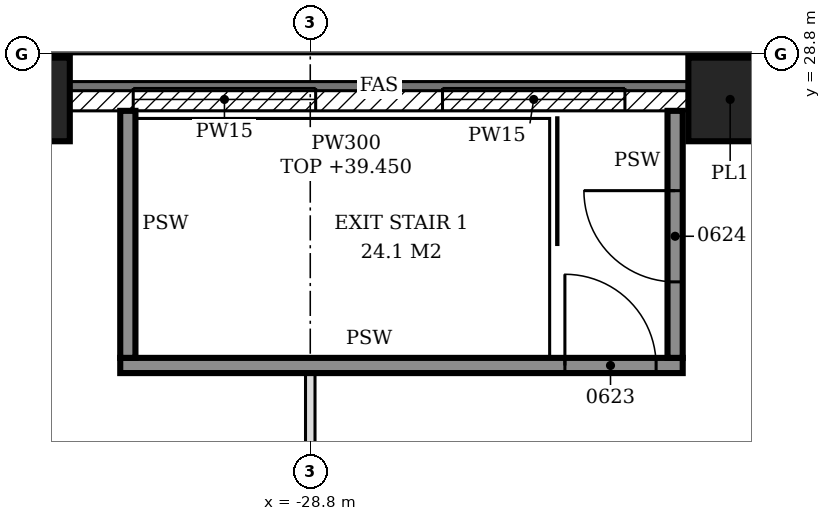
"""IFC4 building model, lengths in metres.
Left out: names, types, materials, properties, quantities, classifications, styles, units other than length and angle.
Written with IfcOpenShell. Run it as: python <this file> out.ifc"""

import sys

from ifc_helpers import new_model, si_unit, direction, frame, frame_2d, origin, origin_2d, place, context, subcontext, project, spatial, polyline, rectangle, hollow_rectangle, outline, extrude, element, fill, save


model = new_model("IFC4")
c1 = context("Model", 3, precision=1e-05, world=origin(), true_north=direction((0.0, 1.0)))
c2 = subcontext(c1, "Body", "Model", "MODEL_VIEW")
j1 = project(units=[si_unit("LENGTHUNIT", "METRE"), si_unit("PLANEANGLEUNIT", "RADIAN")], contexts=[c1])
p1 = place(None, origin())
s1 = spatial("IfcSite", under=j1, at=p1, CompositionType="ELEMENT")
p2 = place(p1, origin())
s2 = spatial("IfcBuilding", under=s1, at=p2, CompositionType="ELEMENT")
p3 = place(p2, frame((0.0, 0.0, 35.4)))
s3 = spatial("IfcBuildingStorey", under=s2, at=p3, CompositionType="ELEMENT", Elevation=35.4)
for number, where, z_axis, x_axis in (
    (1, (-23.276, 28.2, 0.0), (0.0, 0.0, 1.0), (1.0, 0.0, 0.0)),
    (2, (-32.514, 28.2, 0.0), (0.0, 0.0, 1.0), (1.0, 0.0, 0.0)),
):
    element("IfcColumn", number, at=place(p3, frame(where, z_axis=z_axis, x_axis=x_axis)), inside=s3, PredefinedType="COLUMN", context=c2, shape_type="SweptSolid", body=[
        extrude(hollow_rectangle(XDim=1.1, YDim=1.1, WallThickness=0.06, at=origin_2d()), origin(), (0.0, 0.0, 1.0), 4.65),
    ])
p4 = place(p3, frame((-23.826, 28.2, 0.0), z_axis=(0.0, 0.0, 1.0), x_axis=(-1.0, 0.0, 0.0)))
e3 = element("IfcWall", 3, at=p4, inside=s3, PredefinedType="SOLIDWALL", context=c2, shape_type="SweptSolid", body=[
    extrude(rectangle(XDim=8.138, YDim=0.3, at=frame_2d((4.069, 0.0))), origin(), (0.0, 0.0, 1.0), 4.05),
])
p5 = place(p4, frame((0.834, 0.0, 0.9)))
e4 = element("IfcOpeningElement", 4, at=p5, cuts=e3, PredefinedType="OPENING", context=c2, shape_type="SweptSolid", body=[
    extrude(rectangle(XDim=2.4, YDim=1.5, at=frame_2d((1.2, 0.75))), frame((0.0, 0.16, 0.0), z_axis=(0.0, -1.0, 0.0), x_axis=(1.0, 0.0, 0.0)), (0.0, 0.0, 1.0), 0.32),
])
p6 = place(p4, frame((4.903, 0.0, 0.9)))
e5 = element("IfcOpeningElement", 5, at=p6, cuts=e3, PredefinedType="OPENING", context=c2, shape_type="SweptSolid", body=[
    extrude(rectangle(XDim=2.4, YDim=1.5, at=frame_2d((1.2, 0.75))), frame((0.0, 0.16, 0.0), z_axis=(0.0, -1.0, 0.0), x_axis=(1.0, 0.0, 0.0)), (0.0, 0.0, 1.0), 0.32),
])
p7 = place(p3, frame((-28.8, -24.6, 0.0), z_axis=(0.0, 0.0, 1.0), x_axis=(0.0, 1.0, 0.0)))
e6 = element("IfcWall", 6, at=p7, inside=s3, PredefinedType="PARTITIONING", context=c2, shape_type="SweptSolid", body=[
    extrude(outline(polyline([(0.0, 0.0), (49.2, 0.0), (49.2, 4.65), (43.95, 4.65), (43.948, 4.03), (43.65, 4.03), (43.648, 4.65), (39.15, 4.65), (39.148, 4.03), (38.85, 4.03), (38.848, 4.65), (34.35, 4.65), (34.348, 4.03), (34.05, 4.03), (34.048, 4.65), (29.55, 4.65), (29.548, 4.03), (29.25, 4.03), (29.248, 4.65), (24.75, 4.65), (24.748, 4.03), (24.45, 4.03), (24.448, 4.65), (19.95, 4.65), (19.948, 4.03), (19.65, 4.03), (19.648, 4.65), (15.15, 4.65), (15.148, 4.03), (14.85, 4.03), (14.848, 4.65), (10.35, 4.65), (10.348, 4.03), (10.05, 4.03), (10.048, 4.65), (5.55, 4.65), (5.548, 4.03), (5.25, 4.03), (5.248, 4.65), (0.0, 4.65), (0.0, 0.0)])), frame((0.0, 0.062, 0.0), z_axis=(0.0, -1.0, 0.0), x_axis=(1.0, 0.0, 0.0)), (0.0, 0.0, 1.0), 0.125),
])
p8 = place(p7, frame((1.7, 0.0, 0.0)))
e7 = element("IfcOpeningElement", 7, at=p8, cuts=e6, PredefinedType="OPENING", context=c2, shape_type="SweptSolid", body=[
    extrude(rectangle(XDim=1.8, YDim=2.1, at=frame_2d((0.9, 1.05))), frame((0.0, 0.073, 0.0), z_axis=(0.0, -1.0, 0.0), x_axis=(1.0, 0.0, 0.0)), (0.0, 0.0, 1.0), 0.145),
])
p9 = place(p7, frame((8.05, 0.0, 0.0)))
e8 = element("IfcOpeningElement", 8, at=p9, cuts=e6, PredefinedType="OPENING", context=c2, shape_type="SweptSolid", body=[
    extrude(rectangle(XDim=1.8, YDim=2.1, at=frame_2d((0.9, 1.05))), frame((0.0, 0.073, 0.0), z_axis=(0.0, -1.0, 0.0), x_axis=(1.0, 0.0, 0.0)), (0.0, 0.0, 1.0), 0.145),
])
p10 = place(p7, frame((14.7, 0.0, 0.0)))
e9 = element("IfcOpeningElement", 9, at=p10, cuts=e6, PredefinedType="OPENING", context=c2, shape_type="SweptSolid", body=[
    extrude(rectangle(XDim=1.8, YDim=2.1, at=frame_2d((0.9, 1.05))), frame((0.0, 0.073, 0.0), z_axis=(0.0, -1.0, 0.0), x_axis=(1.0, 0.0, 0.0)), (0.0, 0.0, 1.0), 0.145),
])
p11 = place(p7, frame((21.2, 0.0, 0.0)))
e10 = element("IfcOpeningElement", 10, at=p11, cuts=e6, PredefinedType="OPENING", context=c2, shape_type="SweptSolid", body=[
    extrude(rectangle(XDim=1.8, YDim=2.1, at=frame_2d((0.9, 1.05))), frame((0.0, 0.073, 0.0), z_axis=(0.0, -1.0, 0.0), x_axis=(1.0, 0.0, 0.0)), (0.0, 0.0, 1.0), 0.145),
])
p12 = place(p7, frame((26.2, 0.0, 0.0)))
e11 = element("IfcOpeningElement", 11, at=p12, cuts=e6, PredefinedType="OPENING", context=c2, shape_type="SweptSolid", body=[
    extrude(rectangle(XDim=1.8, YDim=2.1, at=frame_2d((0.9, 1.05))), frame((0.0, 0.073, 0.0), z_axis=(0.0, -1.0, 0.0), x_axis=(1.0, 0.0, 0.0)), (0.0, 0.0, 1.0), 0.145),
])
p13 = place(p7, frame((32.7, 0.0, 0.0)))
e12 = element("IfcOpeningElement", 12, at=p13, cuts=e6, PredefinedType="OPENING", context=c2, shape_type="SweptSolid", body=[
    extrude(rectangle(XDim=1.8, YDim=2.1, at=frame_2d((0.9, 1.05))), frame((0.0, 0.073, 0.0), z_axis=(0.0, -1.0, 0.0), x_axis=(1.0, 0.0, 0.0)), (0.0, 0.0, 1.0), 0.145),
])
p14 = place(p7, frame((39.35, 0.0, 0.0)))
e13 = element("IfcOpeningElement", 13, at=p14, cuts=e6, PredefinedType="OPENING", context=c2, shape_type="SweptSolid", body=[
    extrude(rectangle(XDim=1.8, YDim=2.1, at=frame_2d((0.9, 1.05))), frame((0.0, 0.073, 0.0), z_axis=(0.0, -1.0, 0.0), x_axis=(1.0, 0.0, 0.0)), (0.0, 0.0, 1.0), 0.145),
])
p15 = place(p7, frame((45.7, 0.0, 0.0)))
e14 = element("IfcOpeningElement", 14, at=p15, cuts=e6, PredefinedType="OPENING", context=c2, shape_type="SweptSolid", body=[
    extrude(rectangle(XDim=1.8, YDim=2.1, at=frame_2d((0.9, 1.05))), frame((0.0, 0.073, 0.0), z_axis=(0.0, -1.0, 0.0), x_axis=(1.0, 0.0, 0.0)), (0.0, 0.0, 1.0), 0.145),
])
p16 = place(p3, frame((-31.3, 24.7, 0.0), z_axis=(0.0, 0.0, 1.0), x_axis=(1.0, 0.0, 0.0)))
e15 = element("IfcWall", 15, at=p16, inside=s3, PredefinedType="SOLIDWALL", context=c2, shape_type="SweptSolid", body=[
    extrude(rectangle(XDim=7.4, YDim=0.2, at=frame_2d((3.7, 0.0))), origin(), (0.0, 0.0, 1.0), 4.65),
])
p17 = place(p16, frame((5.85, 0.0, 0.0)))
e16 = element("IfcOpeningElement", 16, at=p17, cuts=e15, PredefinedType="OPENING", context=c2, shape_type="SweptSolid", body=[
    extrude(rectangle(XDim=1.2, YDim=2.1, at=frame_2d((0.6, 1.05))), frame((0.0, 0.11, 0.0), z_axis=(0.0, -1.0, 0.0), x_axis=(1.0, 0.0, 0.0)), (0.0, 0.0, 1.0), 0.22),
])
p18 = place(p3, frame((-31.2, 24.8, 0.0), z_axis=(0.0, 0.0, 1.0), x_axis=(0.0, 1.0, 0.0)))
e17 = element("IfcWall", 17, at=p18, inside=s3, PredefinedType="SOLIDWALL", context=c2, shape_type="SweptSolid", body=[
    extrude(rectangle(XDim=3.25, YDim=0.2, at=frame_2d((1.625, 0.0))), origin(), (0.0, 0.0, 1.0), 4.65),
])
p19 = place(p3, frame((-24.0, 24.8, 0.0), z_axis=(0.0, 0.0, 1.0), x_axis=(0.0, 1.0, 0.0)))
e18 = element("IfcWall", 18, at=p19, inside=s3, PredefinedType="SOLIDWALL", context=c2, shape_type="SweptSolid", body=[
    extrude(rectangle(XDim=3.25, YDim=0.2, at=frame_2d((1.625, 0.0))), origin(), (0.0, 0.0, 1.0), 4.65),
])
p20 = place(p19, frame((1.0, 0.0, 0.0)))
e19 = element("IfcOpeningElement", 19, at=p20, cuts=e18, PredefinedType="OPENING", context=c2, shape_type="SweptSolid", body=[
    extrude(rectangle(XDim=1.2, YDim=2.1, at=frame_2d((0.6, 1.05))), frame((0.0, 0.11, 0.0), z_axis=(0.0, -1.0, 0.0), x_axis=(1.0, 0.0, 0.0)), (0.0, 0.0, 1.0), 0.22),
])
p21 = place(p5, origin())
e20 = element("IfcWindow", 20, at=p21, inside=s3, PartitioningType="SINGLE_PANEL", PredefinedType="WINDOW", context=c2, shape_type="SweptSolid", body=[
    extrude(rectangle(XDim=2.4, YDim=1.5, at=frame_2d((1.2, 0.75))), frame((0.0, 0.03, 0.0), z_axis=(0.0, -1.0, 0.0), x_axis=(1.0, 0.0, 0.0)), (0.0, 0.0, 1.0), 0.06),
])
fill(e4, e20)
p22 = place(p6, origin())
e21 = element("IfcWindow", 21, at=p22, inside=s3, PartitioningType="SINGLE_PANEL", PredefinedType="WINDOW", context=c2, shape_type="SweptSolid", body=[
    extrude(rectangle(XDim=2.4, YDim=1.5, at=frame_2d((1.2, 0.75))), frame((0.0, 0.03, 0.0), z_axis=(0.0, -1.0, 0.0), x_axis=(1.0, 0.0, 0.0)), (0.0, 0.0, 1.0), 0.06),
])
fill(e5, e21)
p23 = place(p17, origin())
e22 = element("IfcDoor", 22, at=p23, inside=s3, OperationType="SINGLE_SWING_LEFT", PredefinedType="DOOR", context=c2, shape_type="SweptSolid", body=[
    extrude(rectangle(XDim=1.2, YDim=2.1, at=frame_2d((0.6, 1.05))), frame((0.0, 0.025, 0.0), z_axis=(0.0, -1.0, 0.0), x_axis=(1.0, 0.0, 0.0)), (0.0, 0.0, 1.0), 0.05),
])
fill(e16, e22)
p24 = place(p20, origin())
e23 = element("IfcDoor", 23, at=p24, inside=s3, OperationType="SINGLE_SWING_RIGHT", PredefinedType="DOOR", context=c2, shape_type="SweptSolid", body=[
    extrude(rectangle(XDim=1.2, YDim=2.1, at=frame_2d((0.6, 1.05))), frame((0.0, 0.025, 0.0), z_axis=(0.0, -1.0, 0.0), x_axis=(1.0, 0.0, 0.0)), (0.0, 0.0, 1.0), 0.05),
])
fill(e19, e23)
save(model, sys.argv[1])
